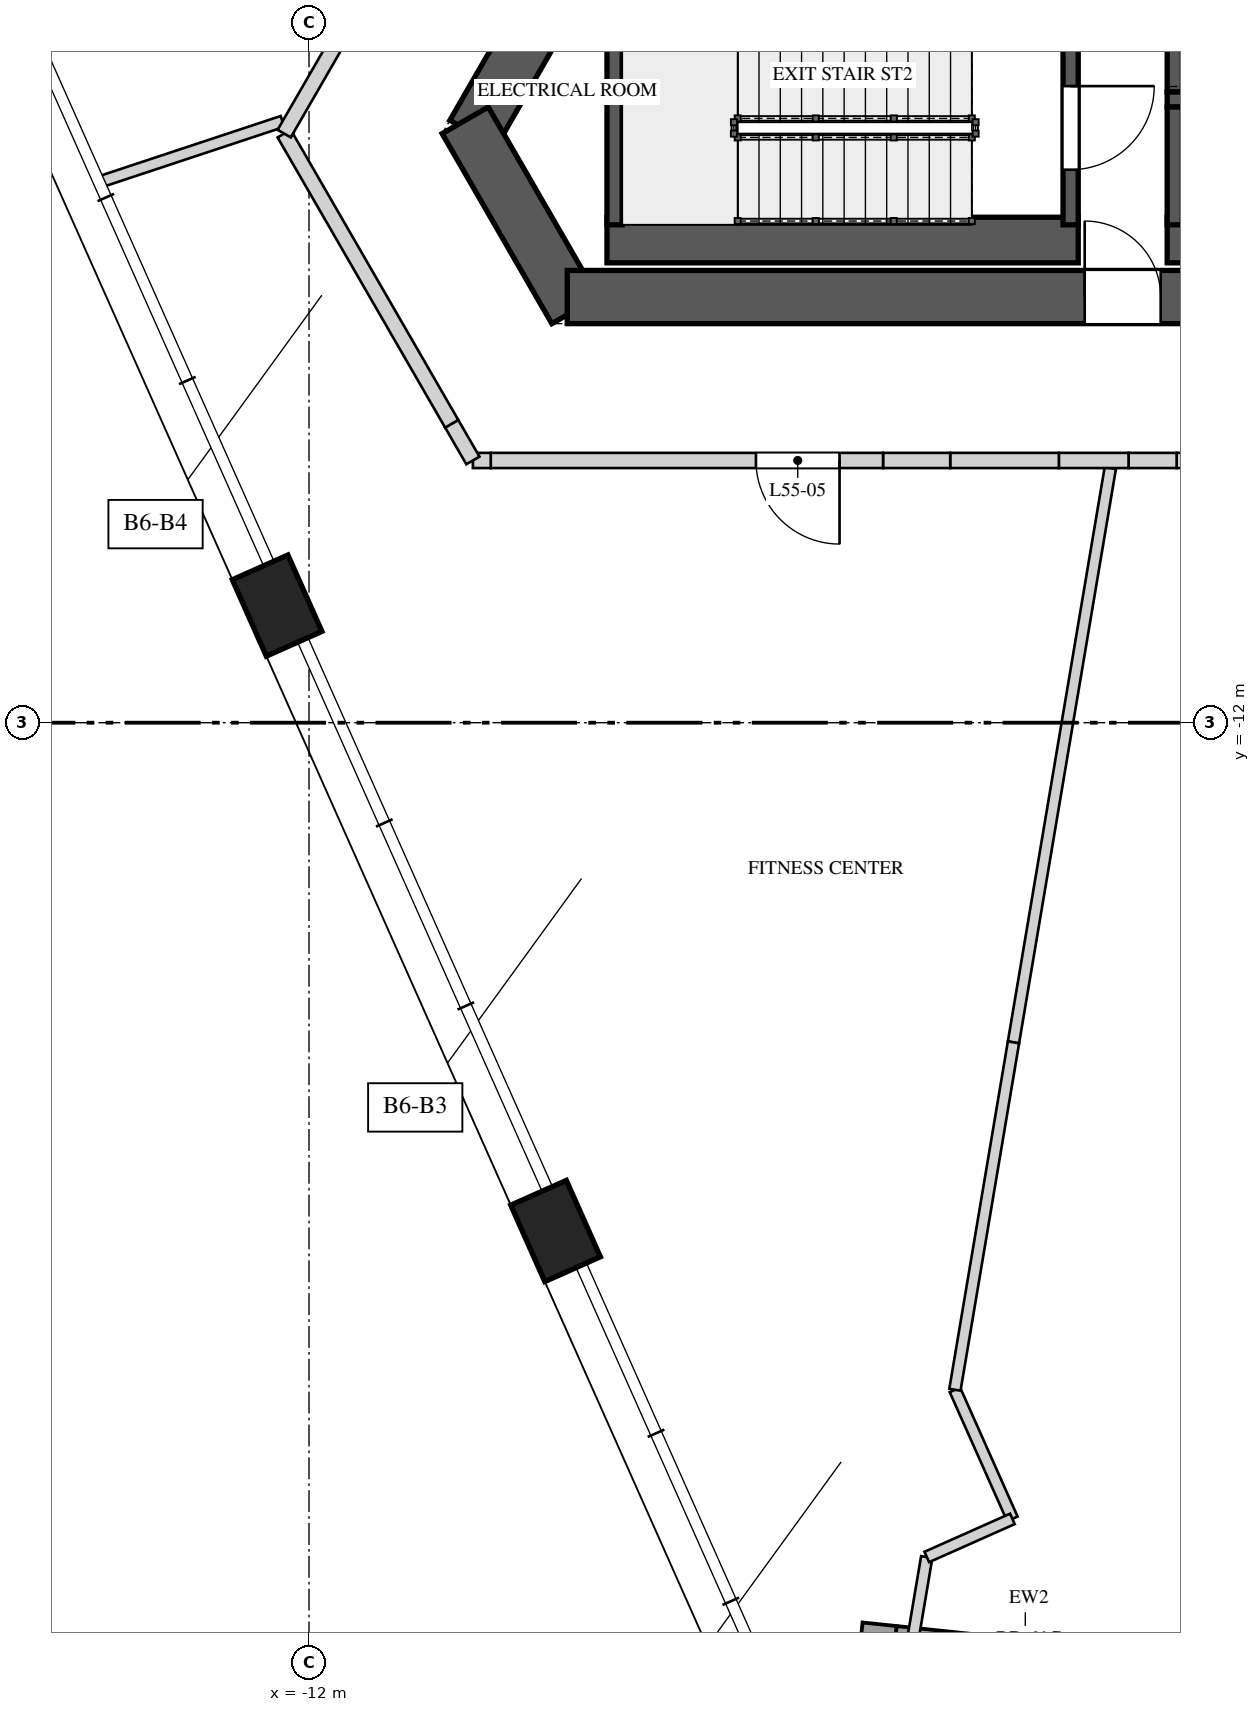
"""IFC4 building model, lengths in metres.
Left out: names, types, materials, properties, quantities, classifications, styles, units other than length and angle.
Written with IfcOpenShell. Run it as: python <this file> out.ifc"""

import sys

from ifc_helpers import new_model, si_unit, direction, frame, frame_2d, origin, origin_2d, place, context, subcontext, project, spatial, polyline, rectangle, outline, extrude, element, fill, save


model = new_model("IFC4")
c1 = context("Model", 3, precision=1e-05, world=origin(), true_north=direction((0.0, 1.0)))
c2 = subcontext(c1, "Body", "Model", "MODEL_VIEW")
j1 = project(units=[si_unit("LENGTHUNIT", "METRE"), si_unit("PLANEANGLEUNIT", "RADIAN")], contexts=[c1])
p1 = place(None, origin())
s1 = spatial("IfcSite", under=j1, at=p1, CompositionType="ELEMENT")
p2 = place(p1, origin())
s2 = spatial("IfcBuilding", under=s1, at=p2, CompositionType="ELEMENT")
p3 = place(p2, frame((0.0, 0.0, 237.2)))
s3 = spatial("IfcBuildingStorey", under=s2, at=p3, CompositionType="ELEMENT", Elevation=237.2)
p4 = place(p3, frame((-1.241, 10.65, 0.0), z_axis=(0.0, 0.0, 1.0), x_axis=(-0.500003331888, -0.866023480109, 0.0)))
e1 = element("IfcWall", 1, at=p4, inside=s3, PredefinedType="SHEAR", context=c2, shape_type="SweptSolid", body=[
    extrude(rectangle(XDim=17.205, YDim=0.7, at=frame_2d((8.603, 0.0))), origin(), (0.0, 0.0, 1.0), 4.0),
])
p5 = place(p4, frame((6.808, 0.0, 0.0)))
e2 = element("IfcOpeningElement", 2, at=p5, cuts=e1, PredefinedType="OPENING", context=c2, shape_type="SweptSolid", body=[
    extrude(rectangle(XDim=1.0, YDim=2.4, at=frame_2d((0.5, 1.2))), frame((0.0, 0.36, 0.0), z_axis=(0.0, -1.0, 0.0), x_axis=(1.0, 0.0, 0.0)), (0.0, 0.0, 1.0), 0.72),
])
p6 = place(p4, frame((14.922, 0.0, 0.0)))
e3 = element("IfcOpeningElement", 3, at=p6, cuts=e1, PredefinedType="OPENING", context=c2, shape_type="SweptSolid", body=[
    extrude(rectangle(XDim=0.8, YDim=2.1, at=frame_2d((0.4, 1.05))), frame((0.0, 0.36, 0.0), z_axis=(0.0, -1.0, 0.0), x_axis=(1.0, 0.0, 0.0)), (0.0, 0.0, 1.0), 0.72),
])
p7 = place(p3, frame((-9.945, -4.075, 0.0), z_axis=(0.0, 0.0, 1.0), x_axis=(0.499995765644, -0.866027848477, 0.0)))
e4 = element("IfcWall", 4, at=p7, inside=s3, PredefinedType="SHEAR", context=c2, shape_type="SweptSolid", body=[
    extrude(rectangle(XDim=2.887, YDim=0.7, at=frame_2d((1.443, 0.0))), origin(), (0.0, 0.0, 1.0), 4.0),
])
p8 = place(p3, frame((-8.603, -6.4, 0.0), z_axis=(0.0, 0.0, 1.0), x_axis=(1.0, 0.0, 0.0)))
e5 = element("IfcWall", 5, at=p8, inside=s3, PredefinedType="SHEAR", context=c2, shape_type="SweptSolid", body=[
    extrude(rectangle(XDim=17.205, YDim=0.7, at=frame_2d((8.603, 0.0))), origin(), (0.0, 0.0, 1.0), 4.0),
])
p9 = place(p8, frame((6.808, 0.0, 0.0)))
e6 = element("IfcOpeningElement", 6, at=p9, cuts=e5, PredefinedType="OPENING", context=c2, shape_type="SweptSolid", body=[
    extrude(rectangle(XDim=1.0, YDim=2.4, at=frame_2d((0.5, 1.2))), frame((0.0, 0.36, 0.0), z_axis=(0.0, -1.0, 0.0), x_axis=(1.0, 0.0, 0.0)), (0.0, 0.0, 1.0), 0.72),
])
p10 = place(p8, frame((14.922, 0.0, 0.0)))
e7 = element("IfcOpeningElement", 7, at=p10, cuts=e5, PredefinedType="OPENING", context=c2, shape_type="SweptSolid", body=[
    extrude(rectangle(XDim=0.8, YDim=2.1, at=frame_2d((0.4, 1.05))), frame((0.0, 0.36, 0.0), z_axis=(0.0, -1.0, 0.0), x_axis=(1.0, 0.0, 0.0)), (0.0, 0.0, 1.0), 0.72),
])
for number, where, z_axis, x_axis in (
    (8, (-12.42, -10.459, -0.35), (0.0, 0.0, 1.0), (0.407, -0.914, 0.0)),
    (9, (-8.756, -18.687, -0.35), (0.0, 0.0, 1.0), (0.407, -0.914, 0.0)),
):
    element("IfcColumn", number, at=place(p3, frame(where, z_axis=z_axis, x_axis=x_axis)), inside=s3, PredefinedType="COLUMN", context=c2, shape_type="SweptSolid", body=[
        extrude(rectangle(XDim=1.1, YDim=0.8, at=origin_2d()), origin(), (0.0, 0.0, 1.0), 4.35),
    ])
p11 = place(p3, frame((-0.836, -24.698, 0.0), z_axis=(0.0, 0.0, 1.0), x_axis=(-0.994518821828, 0.104557701916, 0.0)))
e10 = element("IfcWall", 10, at=p11, inside=s3, PredefinedType="SOLIDWALL", context=c2, shape_type="SweptSolid", body=[
    extrude(rectangle(XDim=3.5, YDim=0.9, at=frame_2d((1.75, 0.0))), origin(), (0.0, 0.0, 1.0), 3.3),
])
p12 = place(p11, frame((0.75, 0.0, 0.0)))
e11 = element("IfcOpeningElement", 11, at=p12, cuts=e10, PredefinedType="OPENING", context=c2, shape_type="SweptSolid", body=[
    extrude(rectangle(XDim=2.0, YDim=2.4, at=frame_2d((1.0, 1.2))), frame((0.0, 0.46, 0.0), z_axis=(0.0, -1.0, 0.0), x_axis=(1.0, 0.0, 0.0)), (0.0, 0.0, 1.0), 0.92),
])
p13 = place(p3, frame((-4.701, -25.829, 0.0), z_axis=(0.0, 0.0, 1.0), x_axis=(0.104607727594, 0.994513561158, 0.0)))
e12 = element("IfcWall", 12, at=p13, inside=s3, PredefinedType="SOLIDWALL", context=c2, shape_type="SweptSolid", body=[
    extrude(rectangle(XDim=1.979, YDim=0.45, at=frame_2d((0.99, 0.0))), origin(), (0.0, 0.0, 1.0), 2.55),
])
p14 = place(p3, frame((-8.08, -5.65, 0.0), z_axis=(0.0, 0.0, 1.0), x_axis=(1.0, 0.0, 0.0)))
e13 = element("IfcWall", 13, at=p14, inside=s3, PredefinedType="SOLIDWALL", context=c2, shape_type="SweptSolid", body=[
    extrude(rectangle(XDim=6.2, YDim=0.6, at=frame_2d((3.1, 0.0))), origin(), (0.0, 0.0, 1.0), 3.65),
])
p15 = place(p3, frame((-7.98, -2.9, 0.0), z_axis=(0.0, 0.0, 1.0), x_axis=(0.0, -1.0, 0.0)))
e14 = element("IfcWall", 14, at=p15, inside=s3, PredefinedType="SOLIDWALL", context=c2, shape_type="SweptSolid", body=[
    extrude(rectangle(XDim=2.55, YDim=0.2, at=frame_2d((1.275, 0.0))), origin(), (0.0, 0.0, 1.0), 3.65),
])
p16 = place(p3, frame((-1.98, -2.9, 0.0), z_axis=(0.0, 0.0, 1.0), x_axis=(0.0, -1.0, 0.0)))
e15 = element("IfcWall", 15, at=p16, inside=s3, PredefinedType="SOLIDWALL", context=c2, shape_type="SweptSolid", body=[
    extrude(rectangle(XDim=2.55, YDim=0.2, at=frame_2d((1.275, 0.0))), origin(), (0.0, 0.0, 1.0), 3.65),
])
p17 = place(p16, frame((0.725, 0.0, 0.0)))
e16 = element("IfcOpeningElement", 16, at=p17, cuts=e15, PredefinedType="OPENING", context=c2, shape_type="SweptSolid", body=[
    extrude(rectangle(XDim=1.1, YDim=2.4, at=frame_2d((0.55, 1.2))), frame((0.0, 0.11, 0.0), z_axis=(0.0, -1.0, 0.0), x_axis=(1.0, 0.0, 0.0)), (0.0, 0.0, 1.0), 0.22),
])
p18 = place(p3, frame((-0.71, -3.8, 0.0), z_axis=(0.0, 0.0, 1.0), x_axis=(1.0, 0.0, 0.0)))
e17 = element("IfcWall", 17, at=p18, inside=s3, PredefinedType="SOLIDWALL", context=c2, shape_type="SweptSolid", body=[
    extrude(rectangle(XDim=5.961, YDim=0.2, at=frame_2d((2.981, 0.0))), origin(), (0.0, 0.0, 1.0), 3.65),
])
p19 = place(p18, frame((1.09, 0.0, 0.0)))
e18 = element("IfcOpeningElement", 18, at=p19, cuts=e17, PredefinedType="OPENING", context=c2, shape_type="SweptSolid", body=[
    extrude(rectangle(XDim=1.1, YDim=2.1, at=frame_2d((0.55, 1.05))), frame((0.0, 0.11, 0.0), z_axis=(0.0, -1.0, 0.0), x_axis=(1.0, 0.0, 0.0)), (0.0, 0.0, 1.0), 0.22),
])
p20 = place(p18, frame((3.74, 0.0, 0.0)))
e19 = element("IfcOpeningElement", 19, at=p20, cuts=e17, PredefinedType="OPENING", context=c2, shape_type="SweptSolid", body=[
    extrude(rectangle(XDim=1.1, YDim=2.1, at=frame_2d((0.55, 1.05))), frame((0.0, 0.11, 0.0), z_axis=(0.0, -1.0, 0.0), x_axis=(1.0, 0.0, 0.0)), (0.0, 0.0, 1.0), 0.22),
])
p21 = place(p3, frame((-0.71, -5.65, 0.0), z_axis=(0.0, 0.0, 1.0), x_axis=(1.0, 0.0, 0.0)))
e20 = element("IfcWall", 20, at=p21, inside=s3, PredefinedType="SOLIDWALL", context=c2, shape_type="SweptSolid", body=[
    extrude(rectangle(XDim=5.5, YDim=0.6, at=frame_2d((2.75, 0.0))), origin(), (0.0, 0.0, 1.0), 3.65),
])
p22 = place(p3, frame((-0.61, -3.9, 0.0), z_axis=(0.0, 0.0, 1.0), x_axis=(0.0, -1.0, 0.0)))
e21 = element("IfcWall", 21, at=p22, inside=s3, PredefinedType="SOLIDWALL", context=c2, shape_type="SweptSolid", body=[
    extrude(rectangle(XDim=1.55, YDim=0.2, at=frame_2d((0.775, 0.0))), origin(), (0.0, 0.0, 1.0), 3.65),
])
p23 = place(p3, frame((-0.61, -2.9, 0.0), z_axis=(0.0, 0.0, 1.0), x_axis=(0.0, -1.0, 0.0)))
e22 = element("IfcWall", 22, at=p23, inside=s3, PredefinedType="SOLIDWALL", context=c2, shape_type="SweptSolid", body=[
    extrude(rectangle(XDim=0.8, YDim=0.2, at=frame_2d((0.4, 0.0))), origin(), (0.0, 0.0, 1.0), 3.65),
])
p24 = place(p3, frame((-12.349, -4.09, 0.0), z_axis=(0.0, 0.0, 1.0), x_axis=(-0.949316867491, -0.314320672398, 0.0)))
e23 = element("IfcWall", 23, at=p24, inside=s3, PredefinedType="PARTITIONING", context=c2, shape_type="SweptSolid", body=[
    extrude(rectangle(XDim=2.497, YDim=0.15, at=frame_2d((1.249, 0.0))), origin(), (0.0, 0.0, 1.0), 3.65),
])
p25 = place(p3, frame((-3.873, -22.977, 0.0), z_axis=(0.0, 0.0, 1.0), x_axis=(-0.166260221615, -0.986081912778, 0.0)))
e24 = element("IfcWall", 24, at=p25, inside=s3, PredefinedType="PARTITIONING", context=c2, shape_type="SweptSolid", body=[
    extrude(rectangle(XDim=1.276, YDim=0.15, at=frame_2d((0.638, 0.0))), origin(), (0.0, 0.0, 1.0), 3.65),
])
p26 = place(p3, frame((-3.502, -20.777, 0.0), z_axis=(0.0, 0.0, 1.0), x_axis=(0.40677227382, -0.913529592981, 0.0)))
e25 = element("IfcWall", 25, at=p26, inside=s3, PredefinedType="PARTITIONING", context=c2, shape_type="SweptSolid", body=[
    extrude(rectangle(XDim=1.858, YDim=0.15, at=frame_2d((0.929, 0.0))), origin(), (0.0, 0.0, 1.0), 3.65),
])
p27 = place(p3, frame((-2.746, -22.474, 0.0), z_axis=(0.0, 0.0, 1.0), x_axis=(-0.913500903341, -0.406836698929, 0.0)))
e26 = element("IfcWall", 26, at=p27, inside=s3, PredefinedType="PARTITIONING", context=c2, shape_type="SweptSolid", body=[
    extrude(rectangle(XDim=1.233, YDim=0.15, at=frame_2d((0.616, 0.0))), origin(), (0.0, 0.0, 1.0), 3.65),
])
p28 = place(p3, frame((-1.458, -8.65, 0.0), z_axis=(0.0, 0.0, 1.0), x_axis=(-0.166222927691, -0.986088200066, 0.0)))
e27 = element("IfcWall", 27, at=p28, inside=s3, PredefinedType="PARTITIONING", context=c2, shape_type="SweptSolid", body=[
    extrude(rectangle(XDim=7.661, YDim=0.15, at=frame_2d((3.831, 0.0))), origin(), (0.0, 0.0, 1.0), 2.55),
])
p29 = place(p3, frame((-2.732, -16.205, 0.0), z_axis=(0.0, 0.0, 1.0), x_axis=(-0.166217863251, -0.986089053755, 0.0)))
e28 = element("IfcWall", 28, at=p29, inside=s3, PredefinedType="PARTITIONING", context=c2, shape_type="SweptSolid", body=[
    extrude(rectangle(XDim=4.635, YDim=0.15, at=frame_2d((2.318, 0.0))), origin(), (0.0, 0.0, 1.0), 3.65),
])
p30 = place(p3, frame((0.804, -8.55, 0.0), z_axis=(0.0, 0.0, 1.0), x_axis=(-1.0, 0.0, 0.0)))
e29 = element("IfcWall", 29, at=p30, inside=s3, PredefinedType="SOLIDWALL", context=c2, shape_type="SweptSolid", body=[
    extrude(outline(polyline([(0.0, 0.0), (1.39, 0.0), (1.39, 2.55), (0.49, 2.55), (0.49, 3.65), (0.0, 3.65), (0.0, 0.0)])), frame((0.0, 0.1, 0.0), z_axis=(0.0, -1.0, 0.0), x_axis=(1.0, 0.0, 0.0)), (0.0, 0.0, 1.0), 0.2),
])
p31 = place(p30, frame((0.05, 0.0, 0.0)))
e30 = element("IfcOpeningElement", 30, at=p31, cuts=e29, PredefinedType="OPENING", context=c2, shape_type="SweptSolid", body=[
    extrude(rectangle(XDim=1.1, YDim=2.4, at=frame_2d((0.55, 1.2))), frame((0.0, 0.11, 0.0), z_axis=(0.0, -1.0, 0.0), x_axis=(1.0, 0.0, 0.0)), (0.0, 0.0, 1.0), 0.22),
])
p32 = place(p3, frame((-0.585, -8.55, 0.0), z_axis=(0.0, 0.0, 1.0), x_axis=(-1.0, 0.0, 0.0)))
e31 = element("IfcWall", 31, at=p32, inside=s3, PredefinedType="SOLIDWALL", context=c2, shape_type="SweptSolid", body=[
    extrude(rectangle(XDim=0.633, YDim=0.2, at=frame_2d((0.316, 0.0))), origin(), (0.0, 0.0, 1.0), 3.65),
])
p33 = place(p3, frame((-1.218, -8.55, 0.0), z_axis=(0.0, 0.0, 1.0), x_axis=(-1.0, 0.0, 0.0)))
e32 = element("IfcWall", 32, at=p33, inside=s3, PredefinedType="SOLIDWALL", context=c2, shape_type="SweptSolid", body=[
    extrude(rectangle(XDim=0.917, YDim=0.2, at=frame_2d((0.458, 0.0))), origin(), (0.0, 0.0, 1.0), 2.55),
])
p34 = place(p3, frame((-2.135, -8.55, 0.0), z_axis=(0.0, 0.0, 1.0), x_axis=(-1.0, 0.0, 0.0)))
e33 = element("IfcWall", 33, at=p34, inside=s3, PredefinedType="SOLIDWALL", context=c2, shape_type="SweptSolid", body=[
    extrude(rectangle(XDim=1.43, YDim=0.2, at=frame_2d((0.715, 0.0))), origin(), (0.0, 0.0, 1.0), 3.65),
])
p35 = place(p3, frame((-3.565, -8.55, 0.0), z_axis=(0.0, 0.0, 1.0), x_axis=(-1.0, 0.0, 0.0)))
e34 = element("IfcWall", 34, at=p35, inside=s3, PredefinedType="SOLIDWALL", context=c2, shape_type="SweptSolid", body=[
    extrude(rectangle(XDim=0.883, YDim=0.2, at=frame_2d((0.442, 0.0))), origin(), (0.0, 0.0, 1.0), 2.75),
])
p36 = place(p3, frame((-4.448, -8.55, 0.0), z_axis=(0.0, 0.0, 1.0), x_axis=(-1.0, 0.0, 0.0)))
e35 = element("IfcWall", 35, at=p36, inside=s3, PredefinedType="SOLIDWALL", context=c2, shape_type="SweptSolid", body=[
    extrude(rectangle(XDim=5.161, YDim=0.2, at=frame_2d((2.581, 0.0))), origin(), (0.0, 0.0, 1.0), 3.65),
])
p37 = place(p36, frame((0.572, 0.0, 0.0)))
e36 = element("IfcOpeningElement", 36, at=p37, cuts=e35, PredefinedType="OPENING", context=c2, shape_type="SweptSolid", body=[
    extrude(rectangle(XDim=1.1, YDim=2.4, at=frame_2d((0.55, 1.2))), frame((0.0, 0.11, 0.0), z_axis=(0.0, -1.0, 0.0), x_axis=(1.0, 0.0, 0.0)), (0.0, 0.0, 1.0), 0.22),
])
p38 = place(p3, frame((-9.609, -8.55, 0.0), z_axis=(0.0, 0.0, 1.0), x_axis=(-1.0, 0.0, 0.0)))
e37 = element("IfcWall", 37, at=p38, inside=s3, PredefinedType="SOLIDWALL", context=c2, shape_type="SweptSolid", body=[
    extrude(rectangle(XDim=0.234, YDim=0.2, at=frame_2d((0.117, 0.0))), origin(), (0.0, 0.0, 1.0), 2.95),
])
p39 = place(p3, frame((-9.844, -8.55, 0.0), z_axis=(0.0, 0.0, 1.0), x_axis=(-0.500000383388, 0.866025182435, 0.0)))
e38 = element("IfcWall", 38, at=p39, inside=s3, PredefinedType="SOLIDWALL", context=c2, shape_type="SweptSolid", body=[
    extrude(rectangle(XDim=0.558, YDim=0.2, at=frame_2d((0.279, 0.0))), origin(), (0.0, 0.0, 1.0), 2.95),
])
p40 = place(p3, frame((-10.123, -8.067, 0.0), z_axis=(0.0, 0.0, 1.0), x_axis=(-0.500005339912, 0.866022320763, 0.0)))
e39 = element("IfcWall", 39, at=p40, inside=s3, PredefinedType="SOLIDWALL", context=c2, shape_type="SweptSolid", body=[
    extrude(rectangle(XDim=4.408, YDim=0.2, at=frame_2d((2.204, 0.0))), origin(), (0.0, 0.0, 1.0), 3.65),
])
p41 = place(p3, frame((-12.326, -4.25, 0.0), z_axis=(0.0, 0.0, 1.0), x_axis=(0.499994514761, 0.866028570666, 0.0)))
e40 = element("IfcWall", 40, at=p41, inside=s3, PredefinedType="SOLIDWALL", context=c2, shape_type="SweptSolid", body=[
    extrude(rectangle(XDim=2.745, YDim=0.2, at=frame_2d((1.372, 0.0))), origin(), (0.0, 0.0, 1.0), 3.65),
])
p42 = place(p17, origin())
e41 = element("IfcDoor", 41, at=p42, inside=s3, OperationType="SINGLE_SWING_LEFT", PredefinedType="DOOR", context=c2, shape_type="SweptSolid", body=[
    extrude(rectangle(XDim=1.1, YDim=2.4, at=frame_2d((0.55, 1.2))), frame((0.0, 0.025, 0.0), z_axis=(0.0, -1.0, 0.0), x_axis=(1.0, 0.0, 0.0)), (0.0, 0.0, 1.0), 0.05),
])
fill(e16, e41)
p43 = place(p9, origin())
e42 = element("IfcDoor", 42, at=p43, inside=s3, OperationType="SINGLE_SWING_LEFT", PredefinedType="DOOR", context=c2, shape_type="SweptSolid", body=[
    extrude(rectangle(XDim=1.0, YDim=2.4, at=frame_2d((0.5, 1.2))), frame((0.0, 0.025, 0.0), z_axis=(0.0, -1.0, 0.0), x_axis=(1.0, 0.0, 0.0)), (0.0, 0.0, 1.0), 0.05),
])
fill(e6, e42)
p44 = place(p37, origin())
e43 = element("IfcDoor", 43, at=p44, inside=s3, OperationType="SINGLE_SWING_LEFT", PredefinedType="DOOR", context=c2, shape_type="SweptSolid", body=[
    extrude(rectangle(XDim=1.1, YDim=2.4, at=frame_2d((0.55, 1.2))), frame((0.0, 0.025, 0.0), z_axis=(0.0, -1.0, 0.0), x_axis=(1.0, 0.0, 0.0)), (0.0, 0.0, 1.0), 0.05),
])
fill(e36, e43)
save(model, sys.argv[1])
